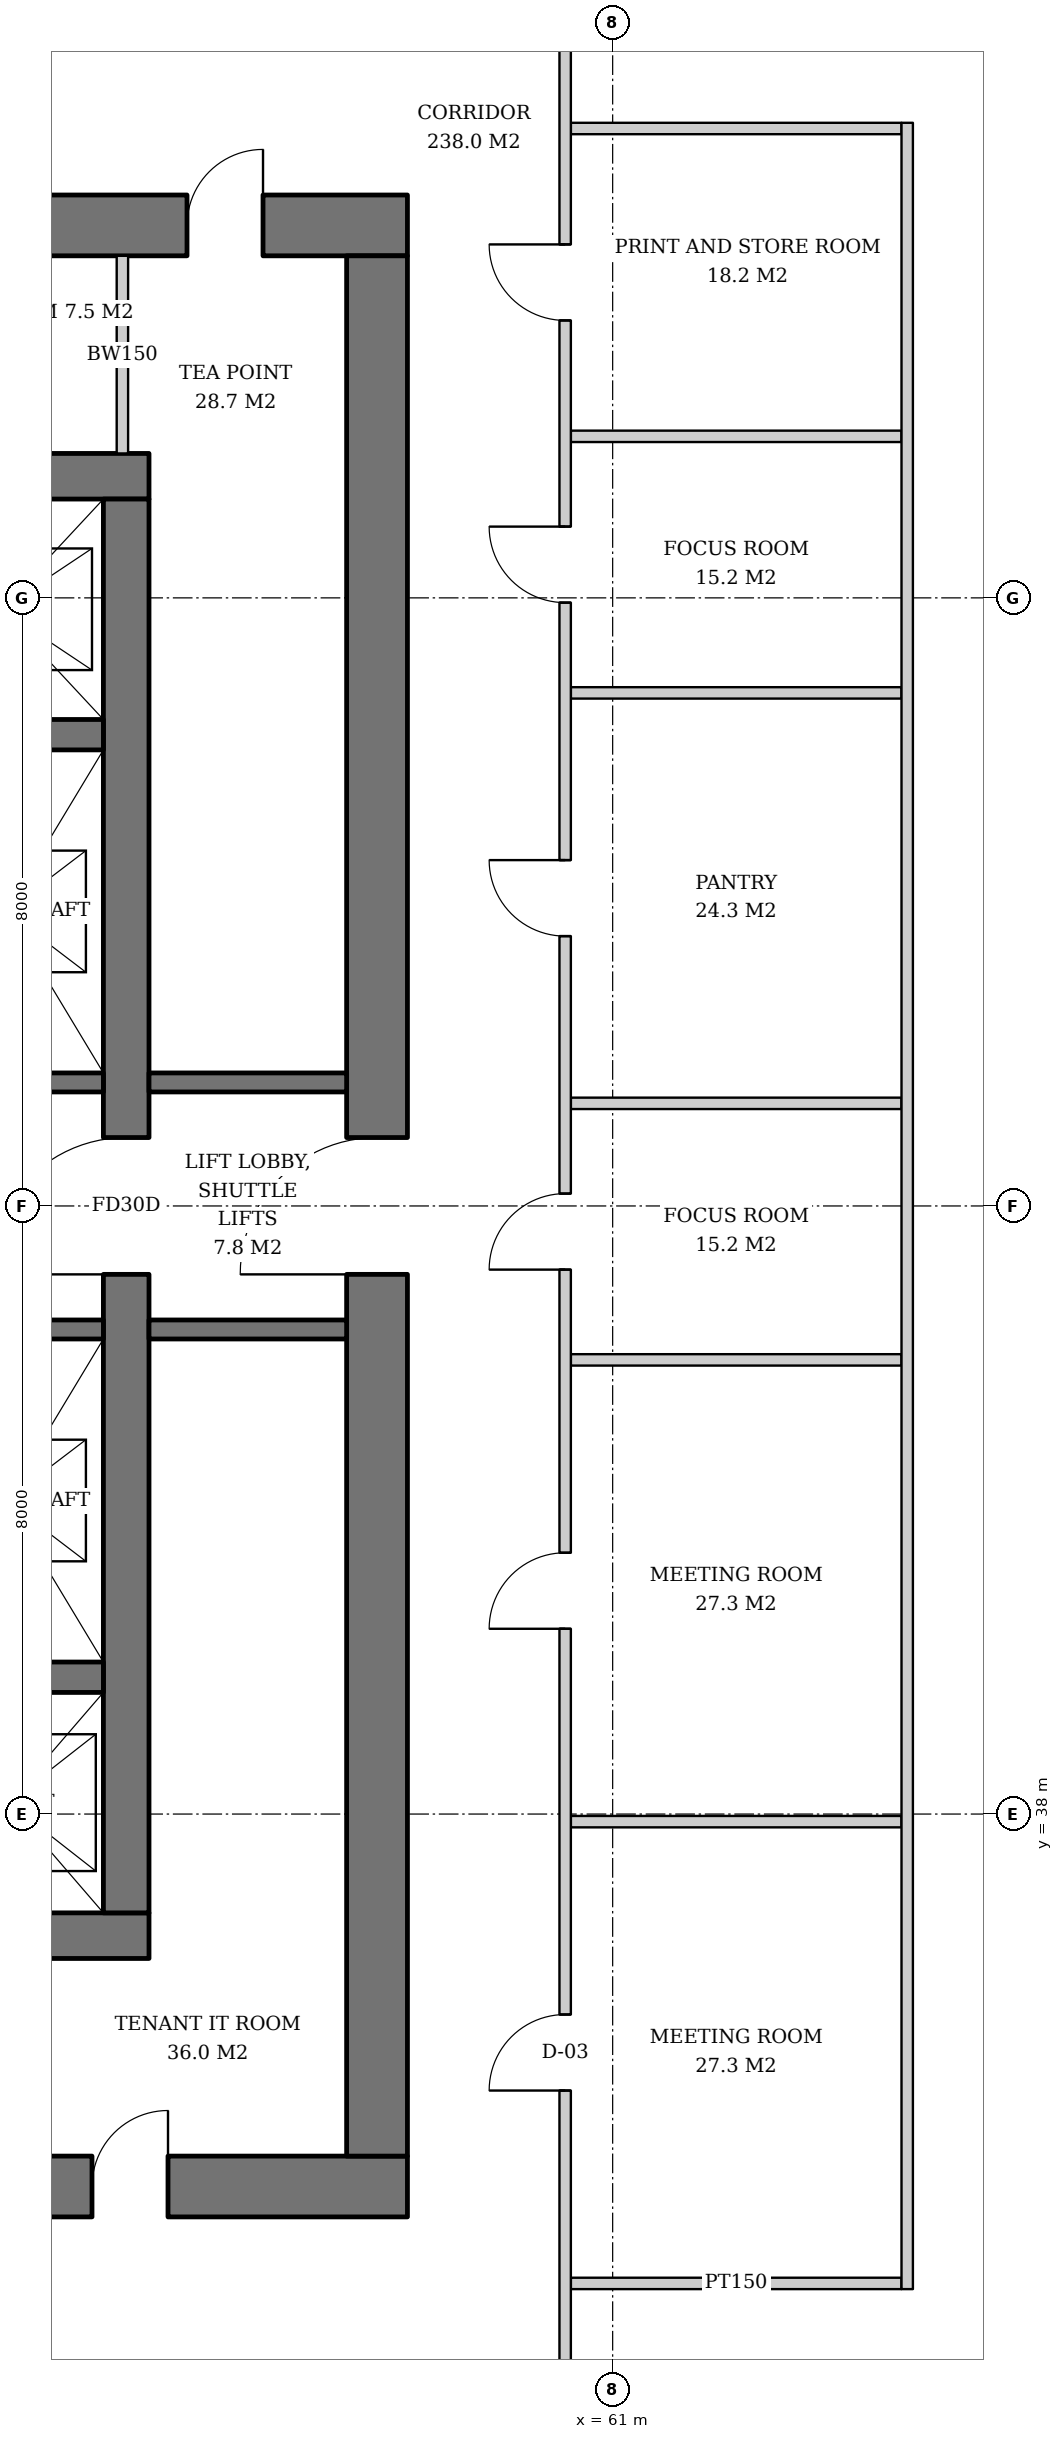
"""IFC4 building model, lengths in metres.
Left out: names, types, materials, properties, quantities, classifications, styles, units other than length and angle.
Written with IfcOpenShell. Run it as: python <this file> out.ifc"""

import sys

from ifc_helpers import new_model, si_unit, direction, frame, frame_2d, origin, place, context, subcontext, project, spatial, rectangle, extrude, element, fill, save


model = new_model("IFC4")
c1 = context("Model", 3, precision=1e-05, world=origin(), true_north=direction((0.0, 1.0)))
c2 = subcontext(c1, "Body", "Model", "MODEL_VIEW")
j1 = project(units=[si_unit("LENGTHUNIT", "METRE"), si_unit("PLANEANGLEUNIT", "RADIAN")], contexts=[c1])
p1 = place(None, origin())
s1 = spatial("IfcSite", under=j1, at=p1, CompositionType="ELEMENT")
p2 = place(p1, origin())
s2 = spatial("IfcBuilding", under=s1, at=p2, CompositionType="ELEMENT")
p3 = place(p2, frame((0.0, 0.0, 21.0)))
s3 = spatial("IfcBuildingStorey", under=s2, at=p3, CompositionType="ELEMENT", Elevation=21.0)
p4 = place(p3, frame((35.1, 36.4, 0.0), z_axis=(0.0, 0.0, 1.0), x_axis=(1.0, 0.0, 0.0)))
e1 = element("IfcWall", 1, at=p4, inside=s3, PredefinedType="SHEAR", context=c2, shape_type="SweptSolid", body=[
    extrude(rectangle(XDim=19.8, YDim=0.6, at=frame_2d((9.9, 0.0))), origin(), (0.0, 0.0, 1.0), 3.8),
])
p5 = place(p4, frame((3.9, 0.0, 0.0)))
e2 = element("IfcOpeningElement", 2, at=p5, cuts=e1, PredefinedType="OPENING", context=c2, shape_type="SweptSolid", body=[
    extrude(rectangle(XDim=1.0, YDim=2.1, at=frame_2d((0.5, 1.05))), frame((0.0, 0.31, 0.0), z_axis=(0.0, -1.0, 0.0), x_axis=(1.0, 0.0, 0.0)), (0.0, 0.0, 1.0), 0.62),
])
p6 = place(p4, frame((15.35, 0.0, 0.0)))
e3 = element("IfcOpeningElement", 3, at=p6, cuts=e1, PredefinedType="OPENING", context=c2, shape_type="SweptSolid", body=[
    extrude(rectangle(XDim=1.0, YDim=2.1, at=frame_2d((0.5, 1.05))), frame((0.0, 0.31, 0.0), z_axis=(0.0, -1.0, 0.0), x_axis=(1.0, 0.0, 0.0)), (0.0, 0.0, 1.0), 0.62),
])
p7 = place(p3, frame((35.1, 55.6, 0.0), z_axis=(0.0, 0.0, 1.0), x_axis=(1.0, 0.0, 0.0)))
e4 = element("IfcWall", 4, at=p7, inside=s3, PredefinedType="SHEAR", context=c2, shape_type="SweptSolid", body=[
    extrude(rectangle(XDim=19.8, YDim=0.6, at=frame_2d((9.9, 0.0))), origin(), (0.0, 0.0, 1.0), 3.8),
])
p8 = place(p7, frame((14.54, 0.0, 0.0)))
e5 = element("IfcOpeningElement", 5, at=p8, cuts=e4, PredefinedType="OPENING", context=c2, shape_type="SweptSolid", body=[
    extrude(rectangle(XDim=1.0, YDim=2.1, at=frame_2d((0.5, 1.05))), frame((0.0, 0.31, 0.0), z_axis=(0.0, -1.0, 0.0), x_axis=(1.0, 0.0, 0.0)), (0.0, 0.0, 1.0), 0.62),
])
p9 = place(p7, frame((2.425, 0.0, 0.0)))
e6 = element("IfcOpeningElement", 6, at=p9, cuts=e4, PredefinedType="OPENING", context=c2, shape_type="SweptSolid", body=[
    extrude(rectangle(XDim=1.0, YDim=2.1, at=frame_2d((0.5, 1.05))), frame((0.0, 0.31, 0.0), z_axis=(0.0, -1.0, 0.0), x_axis=(1.0, 0.0, 0.0)), (0.0, 0.0, 1.0), 0.62),
])
p10 = place(p3, frame((54.6, 36.7, 0.0), z_axis=(0.0, 0.0, 1.0), x_axis=(0.0, 1.0, 0.0)))
e7 = element("IfcWall", 7, at=p10, inside=s3, PredefinedType="SHEAR", context=c2, shape_type="SweptSolid", body=[
    extrude(rectangle(XDim=18.6, YDim=0.6, at=frame_2d((9.3, 0.0))), origin(), (0.0, 0.0, 1.0), 3.8),
])
p11 = place(p10, frame((8.4, 0.0, 0.0)))
e8 = element("IfcOpeningElement", 8, at=p11, cuts=e7, PredefinedType="OPENING", context=c2, shape_type="SweptSolid", body=[
    extrude(rectangle(XDim=1.8, YDim=2.4, at=frame_2d((0.9, 1.2))), frame((0.0, 0.31, 0.0), z_axis=(0.0, -1.0, 0.0), x_axis=(1.0, 0.0, 0.0)), (0.0, 0.0, 1.0), 0.62),
])
p12 = place(p3, frame((31.7, 33.1, 0.0), z_axis=(0.0, 0.0, 1.0), x_axis=(1.0, 0.0, 0.0)))
e9 = element("IfcWall", 9, at=p12, inside=s3, PredefinedType="SHEAR", context=c2, shape_type="SweptSolid", body=[
    extrude(rectangle(XDim=26.6, YDim=0.8, at=frame_2d((13.3, 0.0))), origin(), (0.0, 0.0, 1.0), 3.8),
])
p13 = place(p12, frame((7.3, 0.0, 0.0)))
e10 = element("IfcOpeningElement", 10, at=p13, cuts=e9, PredefinedType="OPENING", context=c2, shape_type="SweptSolid", body=[
    extrude(rectangle(XDim=1.0, YDim=2.1, at=frame_2d((0.5, 1.05))), frame((0.0, 0.41, 0.0), z_axis=(0.0, -1.0, 0.0), x_axis=(1.0, 0.0, 0.0)), (0.0, 0.0, 1.0), 0.82),
])
p14 = place(p12, frame((18.75, 0.0, 0.0)))
e11 = element("IfcOpeningElement", 11, at=p14, cuts=e9, PredefinedType="OPENING", context=c2, shape_type="SweptSolid", body=[
    extrude(rectangle(XDim=1.0, YDim=2.1, at=frame_2d((0.5, 1.05))), frame((0.0, 0.41, 0.0), z_axis=(0.0, -1.0, 0.0), x_axis=(1.0, 0.0, 0.0)), (0.0, 0.0, 1.0), 0.82),
])
p15 = place(p12, frame((3.25, 0.0, 0.0)))
e12 = element("IfcOpeningElement", 12, at=p15, cuts=e9, PredefinedType="OPENING", context=c2, shape_type="SweptSolid", body=[
    extrude(rectangle(XDim=1.0, YDim=2.1, at=frame_2d((0.5, 1.05))), frame((0.0, 0.41, 0.0), z_axis=(0.0, -1.0, 0.0), x_axis=(1.0, 0.0, 0.0)), (0.0, 0.0, 1.0), 0.82),
])
p16 = place(p12, frame((10.42, 0.0, 0.0)))
e13 = element("IfcOpeningElement", 13, at=p16, cuts=e9, PredefinedType="OPENING", context=c2, shape_type="SweptSolid", body=[
    extrude(rectangle(XDim=1.0, YDim=2.1, at=frame_2d((0.5, 1.05))), frame((0.0, 0.41, 0.0), z_axis=(0.0, -1.0, 0.0), x_axis=(1.0, 0.0, 0.0)), (0.0, 0.0, 1.0), 0.82),
])
p17 = place(p12, frame((14.46, 0.0, 0.0)))
e14 = element("IfcOpeningElement", 14, at=p17, cuts=e9, PredefinedType="OPENING", context=c2, shape_type="SweptSolid", body=[
    extrude(rectangle(XDim=1.0, YDim=2.1, at=frame_2d((0.5, 1.05))), frame((0.0, 0.41, 0.0), z_axis=(0.0, -1.0, 0.0), x_axis=(1.0, 0.0, 0.0)), (0.0, 0.0, 1.0), 0.82),
])
p18 = place(p12, frame((22.45, 0.0, 0.0)))
e15 = element("IfcOpeningElement", 15, at=p18, cuts=e9, PredefinedType="OPENING", context=c2, shape_type="SweptSolid", body=[
    extrude(rectangle(XDim=1.0, YDim=2.1, at=frame_2d((0.5, 1.05))), frame((0.0, 0.41, 0.0), z_axis=(0.0, -1.0, 0.0), x_axis=(1.0, 0.0, 0.0)), (0.0, 0.0, 1.0), 0.82),
])
p19 = place(p3, frame((31.7, 58.9, 0.0), z_axis=(0.0, 0.0, 1.0), x_axis=(1.0, 0.0, 0.0)))
e16 = element("IfcWall", 16, at=p19, inside=s3, PredefinedType="SHEAR", context=c2, shape_type="SweptSolid", body=[
    extrude(rectangle(XDim=26.6, YDim=0.8, at=frame_2d((13.3, 0.0))), origin(), (0.0, 0.0, 1.0), 3.8),
])
p20 = place(p19, frame((17.94, 0.0, 0.0)))
e17 = element("IfcOpeningElement", 17, at=p20, cuts=e16, PredefinedType="OPENING", context=c2, shape_type="SweptSolid", body=[
    extrude(rectangle(XDim=1.0, YDim=2.1, at=frame_2d((0.5, 1.05))), frame((0.0, 0.41, 0.0), z_axis=(0.0, -1.0, 0.0), x_axis=(1.0, 0.0, 0.0)), (0.0, 0.0, 1.0), 0.82),
])
p21 = place(p19, frame((5.825, 0.0, 0.0)))
e18 = element("IfcOpeningElement", 18, at=p21, cuts=e16, PredefinedType="OPENING", context=c2, shape_type="SweptSolid", body=[
    extrude(rectangle(XDim=1.0, YDim=2.1, at=frame_2d((0.5, 1.05))), frame((0.0, 0.41, 0.0), z_axis=(0.0, -1.0, 0.0), x_axis=(1.0, 0.0, 0.0)), (0.0, 0.0, 1.0), 0.82),
])
p22 = place(p19, frame((1.233, 0.0, 0.0)))
e19 = element("IfcOpeningElement", 19, at=p22, cuts=e16, PredefinedType="OPENING", context=c2, shape_type="SweptSolid", body=[
    extrude(rectangle(XDim=1.0, YDim=2.1, at=frame_2d((0.5, 1.05))), frame((0.0, 0.41, 0.0), z_axis=(0.0, -1.0, 0.0), x_axis=(1.0, 0.0, 0.0)), (0.0, 0.0, 1.0), 0.82),
])
p23 = place(p19, frame((3.479, 0.0, 0.0)))
e20 = element("IfcOpeningElement", 20, at=p23, cuts=e16, PredefinedType="OPENING", context=c2, shape_type="SweptSolid", body=[
    extrude(rectangle(XDim=1.0, YDim=2.1, at=frame_2d((0.5, 1.05))), frame((0.0, 0.41, 0.0), z_axis=(0.0, -1.0, 0.0), x_axis=(1.0, 0.0, 0.0)), (0.0, 0.0, 1.0), 0.82),
])
p24 = place(p19, frame((11.577, 0.0, 0.0)))
e21 = element("IfcOpeningElement", 21, at=p24, cuts=e16, PredefinedType="OPENING", context=c2, shape_type="SweptSolid", body=[
    extrude(rectangle(XDim=1.0, YDim=2.1, at=frame_2d((0.5, 1.05))), frame((0.0, 0.41, 0.0), z_axis=(0.0, -1.0, 0.0), x_axis=(1.0, 0.0, 0.0)), (0.0, 0.0, 1.0), 0.82),
])
p25 = place(p19, frame((20.875, 0.0, 0.0)))
e22 = element("IfcOpeningElement", 22, at=p25, cuts=e16, PredefinedType="OPENING", context=c2, shape_type="SweptSolid", body=[
    extrude(rectangle(XDim=1.0, YDim=2.1, at=frame_2d((0.5, 1.05))), frame((0.0, 0.41, 0.0), z_axis=(0.0, -1.0, 0.0), x_axis=(1.0, 0.0, 0.0)), (0.0, 0.0, 1.0), 0.82),
])
p26 = place(p19, frame((23.7, 0.0, 0.0)))
e23 = element("IfcOpeningElement", 23, at=p26, cuts=e16, PredefinedType="OPENING", context=c2, shape_type="SweptSolid", body=[
    extrude(rectangle(XDim=1.0, YDim=2.1, at=frame_2d((0.5, 1.05))), frame((0.0, 0.41, 0.0), z_axis=(0.0, -1.0, 0.0), x_axis=(1.0, 0.0, 0.0)), (0.0, 0.0, 1.0), 0.82),
])
p27 = place(p3, frame((57.9, 33.5, 0.0), z_axis=(0.0, 0.0, 1.0), x_axis=(0.0, 1.0, 0.0)))
e24 = element("IfcWall", 24, at=p27, inside=s3, PredefinedType="SHEAR", context=c2, shape_type="SweptSolid", body=[
    extrude(rectangle(XDim=25.0, YDim=0.8, at=frame_2d((12.5, 0.0))), origin(), (0.0, 0.0, 1.0), 3.8),
])
p28 = place(p27, frame((11.6, 0.0, 0.0)))
e25 = element("IfcOpeningElement", 25, at=p28, cuts=e24, PredefinedType="OPENING", context=c2, shape_type="SweptSolid", body=[
    extrude(rectangle(XDim=1.8, YDim=2.4, at=frame_2d((0.9, 1.2))), frame((0.0, 0.41, 0.0), z_axis=(0.0, -1.0, 0.0), x_axis=(1.0, 0.0, 0.0)), (0.0, 0.0, 1.0), 0.82),
])
for number, where, z_axis, x_axis in (
    (26, (35.7, 39.8, 0.0), (0.0, 0.0, 1.0), (1.0, 0.0, 0.0)),
    (27, (35.7, 52.2, 0.0), (0.0, 0.0, 1.0), (1.0, 0.0, 0.0)),
):
    element("IfcWall", number, at=place(p3, frame(where, z_axis=z_axis, x_axis=x_axis)), inside=s3, PredefinedType="SHEAR", context=c2, shape_type="SweptSolid", body=[
        extrude(rectangle(XDim=18.6, YDim=0.4, at=frame_2d((9.3, 0.0))), origin(), (0.0, 0.0, 1.0), 3.8),
    ])
for number, where, z_axis, x_axis in (
    (28, (48.93, 47.625, 0.0), (0.0, 0.0, 1.0), (1.0, 0.0, 0.0)),
    (29, (48.93, 44.375, 0.0), (0.0, 0.0, 1.0), (1.0, 0.0, 0.0)),
):
    element("IfcWall", number, at=place(p3, frame(where, z_axis=z_axis, x_axis=x_axis)), inside=s3, PredefinedType="SHEAR", context=c2, shape_type="SweptSolid", body=[
        extrude(rectangle(XDim=5.37, YDim=0.25, at=frame_2d((2.685, 0.0))), origin(), (0.0, 0.0, 1.0), 3.8),
    ])
for number, where, z_axis, x_axis in (
    (30, (54.9, 44.375, 0.0), (0.0, 0.0, 1.0), (1.0, 0.0, 0.0)),
    (31, (54.9, 47.625, 0.0), (0.0, 0.0, 1.0), (1.0, 0.0, 0.0)),
):
    element("IfcWall", number, at=place(p3, frame(where, z_axis=z_axis, x_axis=x_axis)), inside=s3, PredefinedType="SOLIDWALL", context=c2, shape_type="SweptSolid", body=[
        extrude(rectangle(XDim=2.6, YDim=0.25, at=frame_2d((1.3, 0.0))), origin(), (0.0, 0.0, 1.0), 3.62),
    ])
p29 = place(p3, frame((54.55, 55.9, 0.0), z_axis=(0.0, 0.0, 1.0), x_axis=(0.0, 1.0, 0.0)))
e32 = element("IfcWall", 32, at=p29, inside=s3, PredefinedType="SOLIDWALL", context=c2, shape_type="SweptSolid", body=[
    extrude(rectangle(XDim=2.6, YDim=0.15, at=frame_2d((1.3, 0.0))), origin(), (0.0, 0.0, 1.0), 3.62),
])
p30 = place(p3, frame((60.45, 31.825, 0.0), z_axis=(0.0, 0.0, 1.0), x_axis=(1.0, 0.0, 0.0)))
e33 = element("IfcWall", 33, at=p30, inside=s3, PredefinedType="PARTITIONING", context=c2, shape_type="SweptSolid", body=[
    extrude(rectangle(XDim=4.35, YDim=0.15, at=frame_2d((2.175, 0.0))), origin(), (0.0, 0.0, 1.0), 2.806),
])
for number, where, z_axis, x_axis in (
    (34, (60.45, 37.9, 0.0), (0.0, 0.0, 1.0), (1.0, 0.0, 0.0)),
    (35, (60.45, 43.975, 0.0), (0.0, 0.0, 1.0), (1.0, 0.0, 0.0)),
    (36, (60.45, 47.35, 0.0), (0.0, 0.0, 1.0), (1.0, 0.0, 0.0)),
    (37, (60.45, 52.75, 0.0), (0.0, 0.0, 1.0), (1.0, 0.0, 0.0)),
    (38, (60.45, 56.125, 0.0), (0.0, 0.0, 1.0), (1.0, 0.0, 0.0)),
    (39, (60.45, 60.175, 0.0), (0.0, 0.0, 1.0), (1.0, 0.0, 0.0)),
):
    element("IfcWall", number, at=place(p3, frame(where, z_axis=z_axis, x_axis=x_axis)), inside=s3, PredefinedType="PARTITIONING", context=c2, shape_type="SweptSolid", body=[
        extrude(rectangle(XDim=4.35, YDim=0.15, at=frame_2d((2.175, 0.0))), origin(), (0.0, 0.0, 1.0), 3.62),
    ])
p31 = place(p3, frame((64.875, 31.75, 0.0), z_axis=(0.0, 0.0, 1.0), x_axis=(0.0, 1.0, 0.0)))
e40 = element("IfcWall", 40, at=p31, inside=s3, PredefinedType="PARTITIONING", context=c2, shape_type="SweptSolid", body=[
    extrude(rectangle(XDim=28.5, YDim=0.15, at=frame_2d((14.25, 0.0))), origin(), (0.0, 0.0, 1.0), 2.612),
])
p32 = place(p3, frame((60.375, 30.55, 0.0), z_axis=(0.0, 0.0, 1.0), x_axis=(0.0, 1.0, 0.0)))
e41 = element("IfcWall", 41, at=p32, inside=s3, PredefinedType="PARTITIONING", context=c2, shape_type="SweptSolid", body=[
    extrude(rectangle(XDim=30.75, YDim=0.15, at=frame_2d((15.375, 0.0))), origin(), (0.0, 0.0, 1.0), 2.612),
])
p33 = place(p32, frame((3.812, 0.0, 0.0)))
e42 = element("IfcOpeningElement", 42, at=p33, cuts=e41, PredefinedType="OPENING", context=c2, shape_type="SweptSolid", body=[
    extrude(rectangle(XDim=1.0, YDim=2.1, at=frame_2d((0.5, 1.05))), frame((0.0, 0.085, 0.0), z_axis=(0.0, -1.0, 0.0), x_axis=(1.0, 0.0, 0.0)), (0.0, 0.0, 1.0), 0.17),
])
p34 = place(p32, frame((9.887, 0.0, 0.0)))
e43 = element("IfcOpeningElement", 43, at=p34, cuts=e41, PredefinedType="OPENING", context=c2, shape_type="SweptSolid", body=[
    extrude(rectangle(XDim=1.0, YDim=2.1, at=frame_2d((0.5, 1.05))), frame((0.0, 0.085, 0.0), z_axis=(0.0, -1.0, 0.0), x_axis=(1.0, 0.0, 0.0)), (0.0, 0.0, 1.0), 0.17),
])
p35 = place(p32, frame((14.613, 0.0, 0.0)))
e44 = element("IfcOpeningElement", 44, at=p35, cuts=e41, PredefinedType="OPENING", context=c2, shape_type="SweptSolid", body=[
    extrude(rectangle(XDim=1.0, YDim=2.1, at=frame_2d((0.5, 1.05))), frame((0.0, 0.085, 0.0), z_axis=(0.0, -1.0, 0.0), x_axis=(1.0, 0.0, 0.0)), (0.0, 0.0, 1.0), 0.17),
])
p36 = place(p32, frame((19.0, 0.0, 0.0)))
e45 = element("IfcOpeningElement", 45, at=p36, cuts=e41, PredefinedType="OPENING", context=c2, shape_type="SweptSolid", body=[
    extrude(rectangle(XDim=1.0, YDim=2.1, at=frame_2d((0.5, 1.05))), frame((0.0, 0.085, 0.0), z_axis=(0.0, -1.0, 0.0), x_axis=(1.0, 0.0, 0.0)), (0.0, 0.0, 1.0), 0.17),
])
p37 = place(p32, frame((23.387, 0.0, 0.0)))
e46 = element("IfcOpeningElement", 46, at=p37, cuts=e41, PredefinedType="OPENING", context=c2, shape_type="SweptSolid", body=[
    extrude(rectangle(XDim=1.0, YDim=2.1, at=frame_2d((0.5, 1.05))), frame((0.0, 0.085, 0.0), z_axis=(0.0, -1.0, 0.0), x_axis=(1.0, 0.0, 0.0)), (0.0, 0.0, 1.0), 0.17),
])
p38 = place(p32, frame((27.1, 0.0, 0.0)))
e47 = element("IfcOpeningElement", 47, at=p38, cuts=e41, PredefinedType="OPENING", context=c2, shape_type="SweptSolid", body=[
    extrude(rectangle(XDim=1.0, YDim=2.1, at=frame_2d((0.5, 1.05))), frame((0.0, 0.085, 0.0), z_axis=(0.0, -1.0, 0.0), x_axis=(1.0, 0.0, 0.0)), (0.0, 0.0, 1.0), 0.17),
])
p39 = place(p11, origin())
e48 = element("IfcDoor", 48, at=p39, inside=s3, OperationType="DOUBLE_DOOR_SINGLE_SWING", PredefinedType="DOOR", context=c2, shape_type="SweptSolid", body=[
    extrude(rectangle(XDim=1.8, YDim=2.4, at=frame_2d((0.9, 1.2))), frame((0.0, 0.025, 0.0), z_axis=(0.0, -1.0, 0.0), x_axis=(1.0, 0.0, 0.0)), (0.0, 0.0, 1.0), 0.05),
])
fill(e8, e48)
p40 = place(p28, origin())
e49 = element("IfcDoor", 49, at=p40, inside=s3, OperationType="DOUBLE_DOOR_SINGLE_SWING", PredefinedType="DOOR", context=c2, shape_type="SweptSolid", body=[
    extrude(rectangle(XDim=1.8, YDim=2.4, at=frame_2d((0.9, 1.2))), frame((0.0, 0.025, 0.0), z_axis=(0.0, -1.0, 0.0), x_axis=(1.0, 0.0, 0.0)), (0.0, 0.0, 1.0), 0.05),
])
fill(e25, e49)
p41 = place(p26, origin())
e50 = element("IfcDoor", 50, at=p41, inside=s3, OperationType="SINGLE_SWING_RIGHT", PredefinedType="DOOR", context=c2, shape_type="SweptSolid", body=[
    extrude(rectangle(XDim=1.0, YDim=2.1, at=frame_2d((0.5, 1.05))), frame((0.0, -0.34, 0.0), z_axis=(0.0, -1.0, 0.0), x_axis=(1.0, 0.0, 0.0)), (0.0, 0.0, 1.0), 0.05),
])
fill(e23, e50)
p42 = place(p18, origin())
e51 = element("IfcDoor", 51, at=p42, inside=s3, OperationType="SINGLE_SWING_RIGHT", PredefinedType="DOOR", context=c2, shape_type="SweptSolid", body=[
    extrude(rectangle(XDim=1.0, YDim=2.1, at=frame_2d((0.5, 1.05))), frame((0.0, 0.39, 0.0), z_axis=(0.0, -1.0, 0.0), x_axis=(1.0, 0.0, 0.0)), (0.0, 0.0, 1.0), 0.05),
])
fill(e15, e51)
p43 = place(p33, origin())
e52 = element("IfcDoor", 52, at=p43, inside=s3, OperationType="SINGLE_SWING_LEFT", PredefinedType="DOOR", context=c2, shape_type="SweptSolid", body=[
    extrude(rectangle(XDim=1.0, YDim=2.1, at=frame_2d((0.5, 1.05))), frame((0.0, 0.025, 0.0), z_axis=(0.0, -1.0, 0.0), x_axis=(1.0, 0.0, 0.0)), (0.0, 0.0, 1.0), 0.05),
])
fill(e42, e52)
p44 = place(p34, origin())
e53 = element("IfcDoor", 53, at=p44, inside=s3, OperationType="SINGLE_SWING_LEFT", PredefinedType="DOOR", context=c2, shape_type="SweptSolid", body=[
    extrude(rectangle(XDim=1.0, YDim=2.1, at=frame_2d((0.5, 1.05))), frame((0.0, 0.025, 0.0), z_axis=(0.0, -1.0, 0.0), x_axis=(1.0, 0.0, 0.0)), (0.0, 0.0, 1.0), 0.05),
])
fill(e43, e53)
p45 = place(p35, origin())
e54 = element("IfcDoor", 54, at=p45, inside=s3, OperationType="SINGLE_SWING_LEFT", PredefinedType="DOOR", context=c2, shape_type="SweptSolid", body=[
    extrude(rectangle(XDim=1.0, YDim=2.1, at=frame_2d((0.5, 1.05))), frame((0.0, 0.025, 0.0), z_axis=(0.0, -1.0, 0.0), x_axis=(1.0, 0.0, 0.0)), (0.0, 0.0, 1.0), 0.05),
])
fill(e44, e54)
p46 = place(p36, origin())
e55 = element("IfcDoor", 55, at=p46, inside=s3, OperationType="SINGLE_SWING_RIGHT", PredefinedType="DOOR", context=c2, shape_type="SweptSolid", body=[
    extrude(rectangle(XDim=1.0, YDim=2.1, at=frame_2d((0.5, 1.05))), frame((0.0, 0.025, 0.0), z_axis=(0.0, -1.0, 0.0), x_axis=(1.0, 0.0, 0.0)), (0.0, 0.0, 1.0), 0.05),
])
fill(e45, e55)
p47 = place(p37, origin())
e56 = element("IfcDoor", 56, at=p47, inside=s3, OperationType="SINGLE_SWING_RIGHT", PredefinedType="DOOR", context=c2, shape_type="SweptSolid", body=[
    extrude(rectangle(XDim=1.0, YDim=2.1, at=frame_2d((0.5, 1.05))), frame((0.0, 0.025, 0.0), z_axis=(0.0, -1.0, 0.0), x_axis=(1.0, 0.0, 0.0)), (0.0, 0.0, 1.0), 0.05),
])
fill(e46, e56)
p48 = place(p38, origin())
e57 = element("IfcDoor", 57, at=p48, inside=s3, OperationType="SINGLE_SWING_RIGHT", PredefinedType="DOOR", context=c2, shape_type="SweptSolid", body=[
    extrude(rectangle(XDim=1.0, YDim=2.1, at=frame_2d((0.5, 1.05))), frame((0.0, 0.025, 0.0), z_axis=(0.0, -1.0, 0.0), x_axis=(1.0, 0.0, 0.0)), (0.0, 0.0, 1.0), 0.05),
])
fill(e47, e57)
save(model, sys.argv[1])
